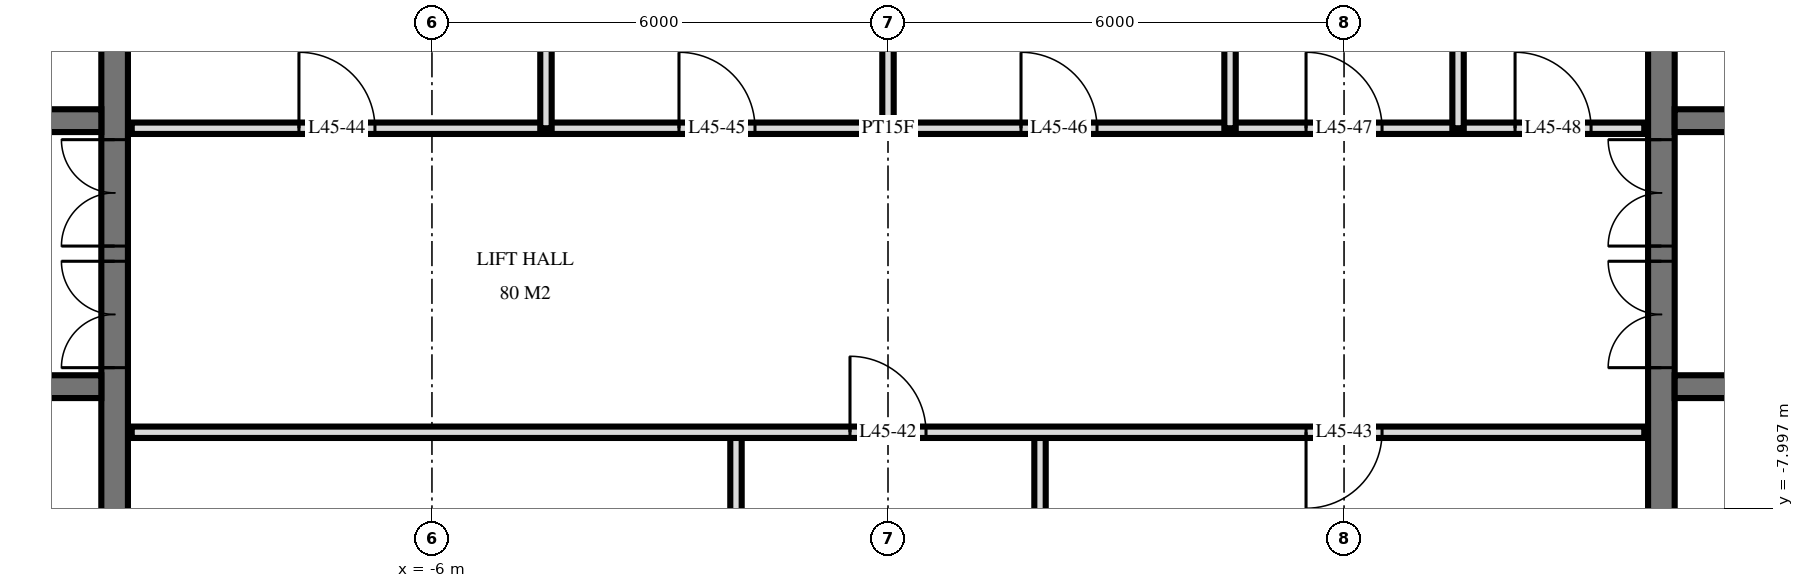
"""IFC4 building model, lengths in metres.
Left out: names, types, materials, properties, quantities, classifications, styles, units other than length and angle.
Written with IfcOpenShell. Run it as: python <this file> out.ifc"""

import sys

from ifc_helpers import new_model, si_unit, direction, frame, frame_2d, origin, place, context, subcontext, project, spatial, rectangle, extrude, element, fill, save


model = new_model("IFC4")
c1 = context("Model", 3, precision=1e-05, world=origin(), true_north=direction((0.0, 1.0)))
c2 = subcontext(c1, "Body", "Model", "MODEL_VIEW")
j1 = project(units=[si_unit("LENGTHUNIT", "METRE"), si_unit("PLANEANGLEUNIT", "RADIAN")], contexts=[c1])
p1 = place(None, origin())
s1 = spatial("IfcSite", under=j1, at=p1, CompositionType="ELEMENT")
p2 = place(p1, origin())
s2 = spatial("IfcBuilding", under=s1, at=p2, CompositionType="ELEMENT")
p3 = place(p2, frame((0.0, 0.0, 174.0)))
s3 = spatial("IfcBuildingStorey", under=s2, at=p3, CompositionType="ELEMENT", Elevation=174.0)
p4 = place(p3, frame((-10.175, -14.55, 0.0), z_axis=(0.0, 0.0, 1.0), x_axis=(0.0, 1.0, 0.0)))
e1 = element("IfcWall", 1, at=p4, inside=s3, PredefinedType="SHEAR", context=c2, shape_type="SweptSolid", body=[
    extrude(rectangle(XDim=14.1, YDim=0.35, at=frame_2d((7.05, 0.0))), origin(), (0.0, 0.0, 1.0), 3.6),
])
p5 = place(p4, frame((8.4, 0.0, 0.0)))
e2 = element("IfcOpeningElement", 2, at=p5, cuts=e1, PredefinedType="OPENING", context=c2, shape_type="SweptSolid", body=[
    extrude(rectangle(XDim=1.4, YDim=2.4, at=frame_2d((0.7, 1.2))), frame((0.0, 0.185, 0.0), z_axis=(0.0, -1.0, 0.0), x_axis=(1.0, 0.0, 0.0)), (0.0, 0.0, 1.0), 0.37),
])
p6 = place(p4, frame((10.0, 0.0, 0.0)))
e3 = element("IfcOpeningElement", 3, at=p6, cuts=e1, PredefinedType="OPENING", context=c2, shape_type="SweptSolid", body=[
    extrude(rectangle(XDim=1.4, YDim=2.4, at=frame_2d((0.7, 1.2))), frame((0.0, 0.185, 0.0), z_axis=(0.0, -1.0, 0.0), x_axis=(1.0, 0.0, 0.0)), (0.0, 0.0, 1.0), 0.37),
])
p7 = place(p4, frame((4.0, 0.0, 0.0)))
e4 = element("IfcOpeningElement", 4, at=p7, cuts=e1, PredefinedType="OPENING", context=c2, shape_type="SweptSolid", body=[
    extrude(rectangle(XDim=1.2, YDim=2.1, at=frame_2d((0.6, 1.05))), frame((0.0, 0.185, 0.0), z_axis=(0.0, -1.0, 0.0), x_axis=(1.0, 0.0, 0.0)), (0.0, 0.0, 1.0), 0.37),
])
p8 = place(p3, frame((-24.05, -2.9, 0.0), z_axis=(0.0, 0.0, 1.0), x_axis=(1.0, 0.0, 0.0)))
e5 = element("IfcWall", 5, at=p8, inside=s3, PredefinedType="SHEAR", context=c2, shape_type="SweptSolid", body=[
    extrude(rectangle(XDim=13.7, YDim=0.3, at=frame_2d((6.85, 0.0))), origin(), (0.0, 0.0, 1.0), 3.6),
])
p9 = place(p8, frame((0.55, 0.0, 0.0)))
e6 = element("IfcOpeningElement", 6, at=p9, cuts=e5, PredefinedType="OPENING", context=c2, shape_type="SweptSolid", body=[
    extrude(rectangle(XDim=1.1, YDim=2.1, at=frame_2d((0.55, 1.05))), frame((0.0, 0.16, 0.0), z_axis=(0.0, -1.0, 0.0), x_axis=(1.0, 0.0, 0.0)), (0.0, 0.0, 1.0), 0.32),
])
p10 = place(p8, frame((5.9, 0.0, 0.0)))
e7 = element("IfcOpeningElement", 7, at=p10, cuts=e5, PredefinedType="OPENING", context=c2, shape_type="SweptSolid", body=[
    extrude(rectangle(XDim=0.9, YDim=2.1, at=frame_2d((0.45, 1.05))), frame((0.0, 0.16, 0.0), z_axis=(0.0, -1.0, 0.0), x_axis=(1.0, 0.0, 0.0)), (0.0, 0.0, 1.0), 0.32),
])
p11 = place(p8, frame((11.85, 0.0, 0.0)))
e8 = element("IfcOpeningElement", 8, at=p11, cuts=e5, PredefinedType="OPENING", context=c2, shape_type="SweptSolid", body=[
    extrude(rectangle(XDim=1.0, YDim=2.1, at=frame_2d((0.5, 1.05))), frame((0.0, 0.16, 0.0), z_axis=(0.0, -1.0, 0.0), x_axis=(1.0, 0.0, 0.0)), (0.0, 0.0, 1.0), 0.32),
])
p12 = place(p8, frame((9.312, 0.0, 0.0)))
e9 = element("IfcOpeningElement", 9, at=p12, cuts=e5, PredefinedType="OPENING", context=c2, shape_type="SweptSolid", body=[
    extrude(rectangle(XDim=1.0, YDim=2.1, at=frame_2d((0.5, 1.05))), frame((0.0, 0.16, 0.0), z_axis=(0.0, -1.0, 0.0), x_axis=(1.0, 0.0, 0.0)), (0.0, 0.0, 1.0), 0.32),
])
p13 = place(p8, frame((7.887, 0.0, 0.0)))
e10 = element("IfcOpeningElement", 10, at=p13, cuts=e5, PredefinedType="OPENING", context=c2, shape_type="SweptSolid", body=[
    extrude(rectangle(XDim=1.0, YDim=2.1, at=frame_2d((0.5, 1.05))), frame((0.0, 0.16, 0.0), z_axis=(0.0, -1.0, 0.0), x_axis=(1.0, 0.0, 0.0)), (0.0, 0.0, 1.0), 0.32),
])
p14 = place(p8, frame((3.0, 0.0, 0.0)))
e11 = element("IfcOpeningElement", 11, at=p14, cuts=e5, PredefinedType="OPENING", context=c2, shape_type="SweptSolid", body=[
    extrude(rectangle(XDim=1.0, YDim=2.1, at=frame_2d((0.5, 1.05))), frame((0.0, 0.16, 0.0), z_axis=(0.0, -1.0, 0.0), x_axis=(1.0, 0.0, 0.0)), (0.0, 0.0, 1.0), 0.32),
])
p15 = place(p3, frame((-24.05, -6.4, 0.0), z_axis=(0.0, 0.0, 1.0), x_axis=(1.0, 0.0, 0.0)))
e12 = element("IfcWall", 12, at=p15, inside=s3, PredefinedType="SHEAR", context=c2, shape_type="SweptSolid", body=[
    extrude(rectangle(XDim=13.7, YDim=0.3, at=frame_2d((6.85, 0.0))), origin(), (0.0, 0.0, 1.0), 3.6),
])
p16 = place(p15, frame((0.55, 0.0, 0.0)))
e13 = element("IfcOpeningElement", 13, at=p16, cuts=e12, PredefinedType="OPENING", context=c2, shape_type="SweptSolid", body=[
    extrude(rectangle(XDim=1.1, YDim=2.1, at=frame_2d((0.55, 1.05))), frame((0.0, 0.16, 0.0), z_axis=(0.0, -1.0, 0.0), x_axis=(1.0, 0.0, 0.0)), (0.0, 0.0, 1.0), 0.32),
])
p17 = place(p15, frame((5.8, 0.0, 0.0)))
e14 = element("IfcOpeningElement", 14, at=p17, cuts=e12, PredefinedType="OPENING", context=c2, shape_type="SweptSolid", body=[
    extrude(rectangle(XDim=1.1, YDim=2.1, at=frame_2d((0.55, 1.05))), frame((0.0, 0.16, 0.0), z_axis=(0.0, -1.0, 0.0), x_axis=(1.0, 0.0, 0.0)), (0.0, 0.0, 1.0), 0.32),
])
p18 = place(p3, frame((10.175, -14.55, 0.0), z_axis=(0.0, 0.0, 1.0), x_axis=(0.0, 1.0, 0.0)))
e15 = element("IfcWall", 15, at=p18, inside=s3, PredefinedType="SHEAR", context=c2, shape_type="SweptSolid", body=[
    extrude(rectangle(XDim=14.1, YDim=0.35, at=frame_2d((7.05, 0.0))), origin(), (0.0, 0.0, 1.0), 3.6),
])
p19 = place(p18, frame((8.4, 0.0, 0.0)))
e16 = element("IfcOpeningElement", 16, at=p19, cuts=e15, PredefinedType="OPENING", context=c2, shape_type="SweptSolid", body=[
    extrude(rectangle(XDim=1.4, YDim=2.4, at=frame_2d((0.7, 1.2))), frame((0.0, 0.185, 0.0), z_axis=(0.0, -1.0, 0.0), x_axis=(1.0, 0.0, 0.0)), (0.0, 0.0, 1.0), 0.37),
])
p20 = place(p18, frame((10.0, 0.0, 0.0)))
e17 = element("IfcOpeningElement", 17, at=p20, cuts=e15, PredefinedType="OPENING", context=c2, shape_type="SweptSolid", body=[
    extrude(rectangle(XDim=1.4, YDim=2.4, at=frame_2d((0.7, 1.2))), frame((0.0, 0.185, 0.0), z_axis=(0.0, -1.0, 0.0), x_axis=(1.0, 0.0, 0.0)), (0.0, 0.0, 1.0), 0.37),
])
p21 = place(p18, frame((4.0, 0.0, 0.0)))
e18 = element("IfcOpeningElement", 18, at=p21, cuts=e15, PredefinedType="OPENING", context=c2, shape_type="SweptSolid", body=[
    extrude(rectangle(XDim=1.2, YDim=2.1, at=frame_2d((0.6, 1.05))), frame((0.0, 0.185, 0.0), z_axis=(0.0, -1.0, 0.0), x_axis=(1.0, 0.0, 0.0)), (0.0, 0.0, 1.0), 0.37),
])
p22 = place(p3, frame((10.35, -2.9, 0.0), z_axis=(0.0, 0.0, 1.0), x_axis=(1.0, 0.0, 0.0)))
e19 = element("IfcWall", 19, at=p22, inside=s3, PredefinedType="SHEAR", context=c2, shape_type="SweptSolid", body=[
    extrude(rectangle(XDim=13.7, YDim=0.3, at=frame_2d((6.85, 0.0))), origin(), (0.0, 0.0, 1.0), 3.6),
])
p23 = place(p22, frame((12.05, 0.0, 0.0)))
e20 = element("IfcOpeningElement", 20, at=p23, cuts=e19, PredefinedType="OPENING", context=c2, shape_type="SweptSolid", body=[
    extrude(rectangle(XDim=1.1, YDim=2.1, at=frame_2d((0.55, 1.05))), frame((0.0, 0.16, 0.0), z_axis=(0.0, -1.0, 0.0), x_axis=(1.0, 0.0, 0.0)), (0.0, 0.0, 1.0), 0.32),
])
p24 = place(p22, frame((6.9, 0.0, 0.0)))
e21 = element("IfcOpeningElement", 21, at=p24, cuts=e19, PredefinedType="OPENING", context=c2, shape_type="SweptSolid", body=[
    extrude(rectangle(XDim=0.9, YDim=2.1, at=frame_2d((0.45, 1.05))), frame((0.0, 0.16, 0.0), z_axis=(0.0, -1.0, 0.0), x_axis=(1.0, 0.0, 0.0)), (0.0, 0.0, 1.0), 0.32),
])
p25 = place(p22, frame((0.85, 0.0, 0.0)))
e22 = element("IfcOpeningElement", 22, at=p25, cuts=e19, PredefinedType="OPENING", context=c2, shape_type="SweptSolid", body=[
    extrude(rectangle(XDim=1.0, YDim=2.1, at=frame_2d((0.5, 1.05))), frame((0.0, 0.16, 0.0), z_axis=(0.0, -1.0, 0.0), x_axis=(1.0, 0.0, 0.0)), (0.0, 0.0, 1.0), 0.32),
])
p26 = place(p22, frame((3.387, 0.0, 0.0)))
e23 = element("IfcOpeningElement", 23, at=p26, cuts=e19, PredefinedType="OPENING", context=c2, shape_type="SweptSolid", body=[
    extrude(rectangle(XDim=1.0, YDim=2.1, at=frame_2d((0.5, 1.05))), frame((0.0, 0.16, 0.0), z_axis=(0.0, -1.0, 0.0), x_axis=(1.0, 0.0, 0.0)), (0.0, 0.0, 1.0), 0.32),
])
p27 = place(p22, frame((4.812, 0.0, 0.0)))
e24 = element("IfcOpeningElement", 24, at=p27, cuts=e19, PredefinedType="OPENING", context=c2, shape_type="SweptSolid", body=[
    extrude(rectangle(XDim=1.0, YDim=2.1, at=frame_2d((0.5, 1.05))), frame((0.0, 0.16, 0.0), z_axis=(0.0, -1.0, 0.0), x_axis=(1.0, 0.0, 0.0)), (0.0, 0.0, 1.0), 0.32),
])
p28 = place(p22, frame((9.7, 0.0, 0.0)))
e25 = element("IfcOpeningElement", 25, at=p28, cuts=e19, PredefinedType="OPENING", context=c2, shape_type="SweptSolid", body=[
    extrude(rectangle(XDim=1.0, YDim=2.1, at=frame_2d((0.5, 1.05))), frame((0.0, 0.16, 0.0), z_axis=(0.0, -1.0, 0.0), x_axis=(1.0, 0.0, 0.0)), (0.0, 0.0, 1.0), 0.32),
])
p29 = place(p3, frame((10.35, -6.4, 0.0), z_axis=(0.0, 0.0, 1.0), x_axis=(1.0, 0.0, 0.0)))
e26 = element("IfcWall", 26, at=p29, inside=s3, PredefinedType="SHEAR", context=c2, shape_type="SweptSolid", body=[
    extrude(rectangle(XDim=13.7, YDim=0.3, at=frame_2d((6.85, 0.0))), origin(), (0.0, 0.0, 1.0), 3.6),
])
p30 = place(p29, frame((12.05, 0.0, 0.0)))
e27 = element("IfcOpeningElement", 27, at=p30, cuts=e26, PredefinedType="OPENING", context=c2, shape_type="SweptSolid", body=[
    extrude(rectangle(XDim=1.1, YDim=2.1, at=frame_2d((0.55, 1.05))), frame((0.0, 0.16, 0.0), z_axis=(0.0, -1.0, 0.0), x_axis=(1.0, 0.0, 0.0)), (0.0, 0.0, 1.0), 0.32),
])
p31 = place(p29, frame((6.8, 0.0, 0.0)))
e28 = element("IfcOpeningElement", 28, at=p31, cuts=e26, PredefinedType="OPENING", context=c2, shape_type="SweptSolid", body=[
    extrude(rectangle(XDim=1.1, YDim=2.1, at=frame_2d((0.55, 1.05))), frame((0.0, 0.16, 0.0), z_axis=(0.0, -1.0, 0.0), x_axis=(1.0, 0.0, 0.0)), (0.0, 0.0, 1.0), 0.32),
])
for number, where, z_axis, x_axis in (
    (29, (7.5, -3.0, 0.0), (0.0, 0.0, 1.0), (0.0, 1.0, 0.0)),
    (30, (4.5, -3.0, 0.0), (0.0, 0.0, 1.0), (0.0, 1.0, 0.0)),
):
    element("IfcWall", number, at=place(p3, frame(where, z_axis=z_axis, x_axis=x_axis)), inside=s3, PredefinedType="PLUMBINGWALL", context=c2, shape_type="SweptSolid", body=[
        extrude(rectangle(XDim=4.02, YDim=0.15, at=frame_2d((2.01, 0.0))), origin(), (0.0, 0.0, 1.0), 3.32),
    ])
p32 = place(p3, frame((2.0, -11.0, 0.0), z_axis=(0.0, 0.0, 1.0), x_axis=(0.0, 1.0, 0.0)))
e31 = element("IfcWall", 31, at=p32, inside=s3, PredefinedType="PARTITIONING", context=c2, shape_type="SweptSolid", body=[
    extrude(rectangle(XDim=4.0, YDim=0.15, at=frame_2d((2.0, 0.0))), origin(), (0.0, 0.0, 1.0), 3.32),
])
p33 = place(p3, frame((0.0, -3.0, 0.0), z_axis=(0.0, 0.0, 1.0), x_axis=(0.0, 1.0, 0.0)))
e32 = element("IfcWall", 32, at=p33, inside=s3, PredefinedType="PARTITIONING", context=c2, shape_type="SweptSolid", body=[
    extrude(rectangle(XDim=4.02, YDim=0.15, at=frame_2d((2.01, 0.0))), origin(), (0.0, 0.0, 1.0), 3.32),
])
p34 = place(p3, frame((-2.0, -11.0, 0.0), z_axis=(0.0, 0.0, 1.0), x_axis=(0.0, 1.0, 0.0)))
e33 = element("IfcWall", 33, at=p34, inside=s3, PredefinedType="PARTITIONING", context=c2, shape_type="SweptSolid", body=[
    extrude(rectangle(XDim=4.0, YDim=0.15, at=frame_2d((2.0, 0.0))), origin(), (0.0, 0.0, 1.0), 3.32),
])
p35 = place(p3, frame((-4.5, -3.0, 0.0), z_axis=(0.0, 0.0, 1.0), x_axis=(0.0, 1.0, 0.0)))
e34 = element("IfcWall", 34, at=p35, inside=s3, PredefinedType="PARTITIONING", context=c2, shape_type="SweptSolid", body=[
    extrude(rectangle(XDim=4.02, YDim=0.15, at=frame_2d((2.01, 0.0))), origin(), (0.0, 0.0, 1.0), 3.32),
])
p36 = place(p3, frame((-9.95, -7.0, 0.0), z_axis=(0.0, 0.0, 1.0), x_axis=(1.0, 0.0, 0.0)))
e35 = element("IfcWall", 35, at=p36, inside=s3, PredefinedType="PARTITIONING", context=c2, shape_type="SweptSolid", body=[
    extrude(rectangle(XDim=19.9, YDim=0.15, at=frame_2d((9.95, 0.0))), origin(), (0.0, 0.0, 1.0), 3.32),
])
p37 = place(p36, frame((9.45, 0.0, 0.0)))
e36 = element("IfcOpeningElement", 36, at=p37, cuts=e35, PredefinedType="OPENING", context=c2, shape_type="SweptSolid", body=[
    extrude(rectangle(XDim=1.0, YDim=2.1, at=frame_2d((0.5, 1.05))), frame((0.0, 0.085, 0.0), z_axis=(0.0, -1.0, 0.0), x_axis=(1.0, 0.0, 0.0)), (0.0, 0.0, 1.0), 0.17),
])
p38 = place(p36, frame((15.45, 0.0, 0.0)))
e37 = element("IfcOpeningElement", 37, at=p38, cuts=e35, PredefinedType="OPENING", context=c2, shape_type="SweptSolid", body=[
    extrude(rectangle(XDim=1.0, YDim=2.1, at=frame_2d((0.5, 1.05))), frame((0.0, 0.085, 0.0), z_axis=(0.0, -1.0, 0.0), x_axis=(1.0, 0.0, 0.0)), (0.0, 0.0, 1.0), 0.17),
])
p39 = place(p3, frame((-9.95, -3.0, 0.0), z_axis=(0.0, 0.0, 1.0), x_axis=(1.0, 0.0, 0.0)))
e38 = element("IfcWall", 38, at=p39, inside=s3, PredefinedType="PARTITIONING", context=c2, shape_type="SweptSolid", body=[
    extrude(rectangle(XDim=19.9, YDim=0.15, at=frame_2d((9.95, 0.0))), origin(), (0.0, 0.0, 1.0), 3.32),
])
p40 = place(p39, frame((2.2, 0.0, 0.0)))
e39 = element("IfcOpeningElement", 39, at=p40, cuts=e38, PredefinedType="OPENING", context=c2, shape_type="SweptSolid", body=[
    extrude(rectangle(XDim=1.0, YDim=2.1, at=frame_2d((0.5, 1.05))), frame((0.0, 0.085, 0.0), z_axis=(0.0, -1.0, 0.0), x_axis=(1.0, 0.0, 0.0)), (0.0, 0.0, 1.0), 0.17),
])
p41 = place(p39, frame((7.2, 0.0, 0.0)))
e40 = element("IfcOpeningElement", 40, at=p41, cuts=e38, PredefinedType="OPENING", context=c2, shape_type="SweptSolid", body=[
    extrude(rectangle(XDim=1.0, YDim=2.1, at=frame_2d((0.5, 1.05))), frame((0.0, 0.085, 0.0), z_axis=(0.0, -1.0, 0.0), x_axis=(1.0, 0.0, 0.0)), (0.0, 0.0, 1.0), 0.17),
])
p42 = place(p39, frame((11.7, 0.0, 0.0)))
e41 = element("IfcOpeningElement", 41, at=p42, cuts=e38, PredefinedType="OPENING", context=c2, shape_type="SweptSolid", body=[
    extrude(rectangle(XDim=1.0, YDim=2.1, at=frame_2d((0.5, 1.05))), frame((0.0, 0.085, 0.0), z_axis=(0.0, -1.0, 0.0), x_axis=(1.0, 0.0, 0.0)), (0.0, 0.0, 1.0), 0.17),
])
p43 = place(p39, frame((15.45, 0.0, 0.0)))
e42 = element("IfcOpeningElement", 42, at=p43, cuts=e38, PredefinedType="OPENING", context=c2, shape_type="SweptSolid", body=[
    extrude(rectangle(XDim=1.0, YDim=2.1, at=frame_2d((0.5, 1.05))), frame((0.0, 0.085, 0.0), z_axis=(0.0, -1.0, 0.0), x_axis=(1.0, 0.0, 0.0)), (0.0, 0.0, 1.0), 0.17),
])
p44 = place(p39, frame((18.2, 0.0, 0.0)))
e43 = element("IfcOpeningElement", 43, at=p44, cuts=e38, PredefinedType="OPENING", context=c2, shape_type="SweptSolid", body=[
    extrude(rectangle(XDim=1.0, YDim=2.1, at=frame_2d((0.5, 1.05))), frame((0.0, 0.085, 0.0), z_axis=(0.0, -1.0, 0.0), x_axis=(1.0, 0.0, 0.0)), (0.0, 0.0, 1.0), 0.17),
])
p45 = place(p5, origin())
e44 = element("IfcDoor", 44, at=p45, inside=s3, OperationType="DOUBLE_DOOR_SINGLE_SWING", PredefinedType="DOOR", context=c2, shape_type="SweptSolid", body=[
    extrude(rectangle(XDim=1.4, YDim=2.4, at=frame_2d((0.7, 1.2))), frame((0.0, 0.025, 0.0), z_axis=(0.0, -1.0, 0.0), x_axis=(1.0, 0.0, 0.0)), (0.0, 0.0, 1.0), 0.05),
])
fill(e2, e44)
p46 = place(p6, origin())
e45 = element("IfcDoor", 45, at=p46, inside=s3, OperationType="DOUBLE_DOOR_SINGLE_SWING", PredefinedType="DOOR", context=c2, shape_type="SweptSolid", body=[
    extrude(rectangle(XDim=1.4, YDim=2.4, at=frame_2d((0.7, 1.2))), frame((0.0, 0.025, 0.0), z_axis=(0.0, -1.0, 0.0), x_axis=(1.0, 0.0, 0.0)), (0.0, 0.0, 1.0), 0.05),
])
fill(e3, e45)
p47 = place(p19, origin())
e46 = element("IfcDoor", 46, at=p47, inside=s3, OperationType="DOUBLE_DOOR_SINGLE_SWING", PredefinedType="DOOR", context=c2, shape_type="SweptSolid", body=[
    extrude(rectangle(XDim=1.4, YDim=2.4, at=frame_2d((0.7, 1.2))), frame((0.0, 0.025, 0.0), z_axis=(0.0, -1.0, 0.0), x_axis=(1.0, 0.0, 0.0)), (0.0, 0.0, 1.0), 0.05),
])
fill(e16, e46)
p48 = place(p20, origin())
e47 = element("IfcDoor", 47, at=p48, inside=s3, OperationType="DOUBLE_DOOR_SINGLE_SWING", PredefinedType="DOOR", context=c2, shape_type="SweptSolid", body=[
    extrude(rectangle(XDim=1.4, YDim=2.4, at=frame_2d((0.7, 1.2))), frame((0.0, 0.025, 0.0), z_axis=(0.0, -1.0, 0.0), x_axis=(1.0, 0.0, 0.0)), (0.0, 0.0, 1.0), 0.05),
])
fill(e17, e47)
p49 = place(p37, origin())
e48 = element("IfcDoor", 48, at=p49, inside=s3, OperationType="SINGLE_SWING_RIGHT", PredefinedType="DOOR", context=c2, shape_type="SweptSolid", body=[
    extrude(rectangle(XDim=1.0, YDim=2.1, at=frame_2d((0.5, 1.05))), frame((0.0, 0.025, 0.0), z_axis=(0.0, -1.0, 0.0), x_axis=(1.0, 0.0, 0.0)), (0.0, 0.0, 1.0), 0.05),
])
fill(e36, e48)
p50 = place(p38, frame((0.5, 0.0, 0.0), z_axis=(0.0, 0.0, 1.0), x_axis=(-1.0, 0.0, 0.0)))
e49 = element("IfcDoor", 49, at=p50, inside=s3, OperationType="SINGLE_SWING_LEFT", PredefinedType="DOOR", context=c2, shape_type="SweptSolid", body=[
    extrude(rectangle(XDim=1.0, YDim=2.1, at=frame_2d((0.0, 1.05))), frame((0.0, -0.025, 0.0), z_axis=(0.0, 1.0, 0.0), x_axis=(-1.0, 0.0, 0.0)), (0.0, 0.0, 1.0), 0.05),
])
fill(e37, e49)
p51 = place(p40, origin())
e50 = element("IfcDoor", 50, at=p51, inside=s3, OperationType="SINGLE_SWING_RIGHT", PredefinedType="DOOR", context=c2, shape_type="SweptSolid", body=[
    extrude(rectangle(XDim=1.0, YDim=2.1, at=frame_2d((0.5, 1.05))), frame((0.0, 0.025, 0.0), z_axis=(0.0, -1.0, 0.0), x_axis=(1.0, 0.0, 0.0)), (0.0, 0.0, 1.0), 0.05),
])
fill(e39, e50)
p52 = place(p41, origin())
e51 = element("IfcDoor", 51, at=p52, inside=s3, OperationType="SINGLE_SWING_RIGHT", PredefinedType="DOOR", context=c2, shape_type="SweptSolid", body=[
    extrude(rectangle(XDim=1.0, YDim=2.1, at=frame_2d((0.5, 1.05))), frame((0.0, 0.025, 0.0), z_axis=(0.0, -1.0, 0.0), x_axis=(1.0, 0.0, 0.0)), (0.0, 0.0, 1.0), 0.05),
])
fill(e40, e51)
p53 = place(p42, origin())
e52 = element("IfcDoor", 52, at=p53, inside=s3, OperationType="SINGLE_SWING_RIGHT", PredefinedType="DOOR", context=c2, shape_type="SweptSolid", body=[
    extrude(rectangle(XDim=1.0, YDim=2.1, at=frame_2d((0.5, 1.05))), frame((0.0, 0.025, 0.0), z_axis=(0.0, -1.0, 0.0), x_axis=(1.0, 0.0, 0.0)), (0.0, 0.0, 1.0), 0.05),
])
fill(e41, e52)
p54 = place(p43, origin())
e53 = element("IfcDoor", 53, at=p54, inside=s3, OperationType="SINGLE_SWING_RIGHT", PredefinedType="DOOR", context=c2, shape_type="SweptSolid", body=[
    extrude(rectangle(XDim=1.0, YDim=2.1, at=frame_2d((0.5, 1.05))), frame((0.0, 0.025, 0.0), z_axis=(0.0, -1.0, 0.0), x_axis=(1.0, 0.0, 0.0)), (0.0, 0.0, 1.0), 0.05),
])
fill(e42, e53)
p55 = place(p44, origin())
e54 = element("IfcDoor", 54, at=p55, inside=s3, OperationType="SINGLE_SWING_RIGHT", PredefinedType="DOOR", context=c2, shape_type="SweptSolid", body=[
    extrude(rectangle(XDim=1.0, YDim=2.1, at=frame_2d((0.5, 1.05))), frame((0.0, 0.025, 0.0), z_axis=(0.0, -1.0, 0.0), x_axis=(1.0, 0.0, 0.0)), (0.0, 0.0, 1.0), 0.05),
])
fill(e43, e54)
save(model, sys.argv[1])
